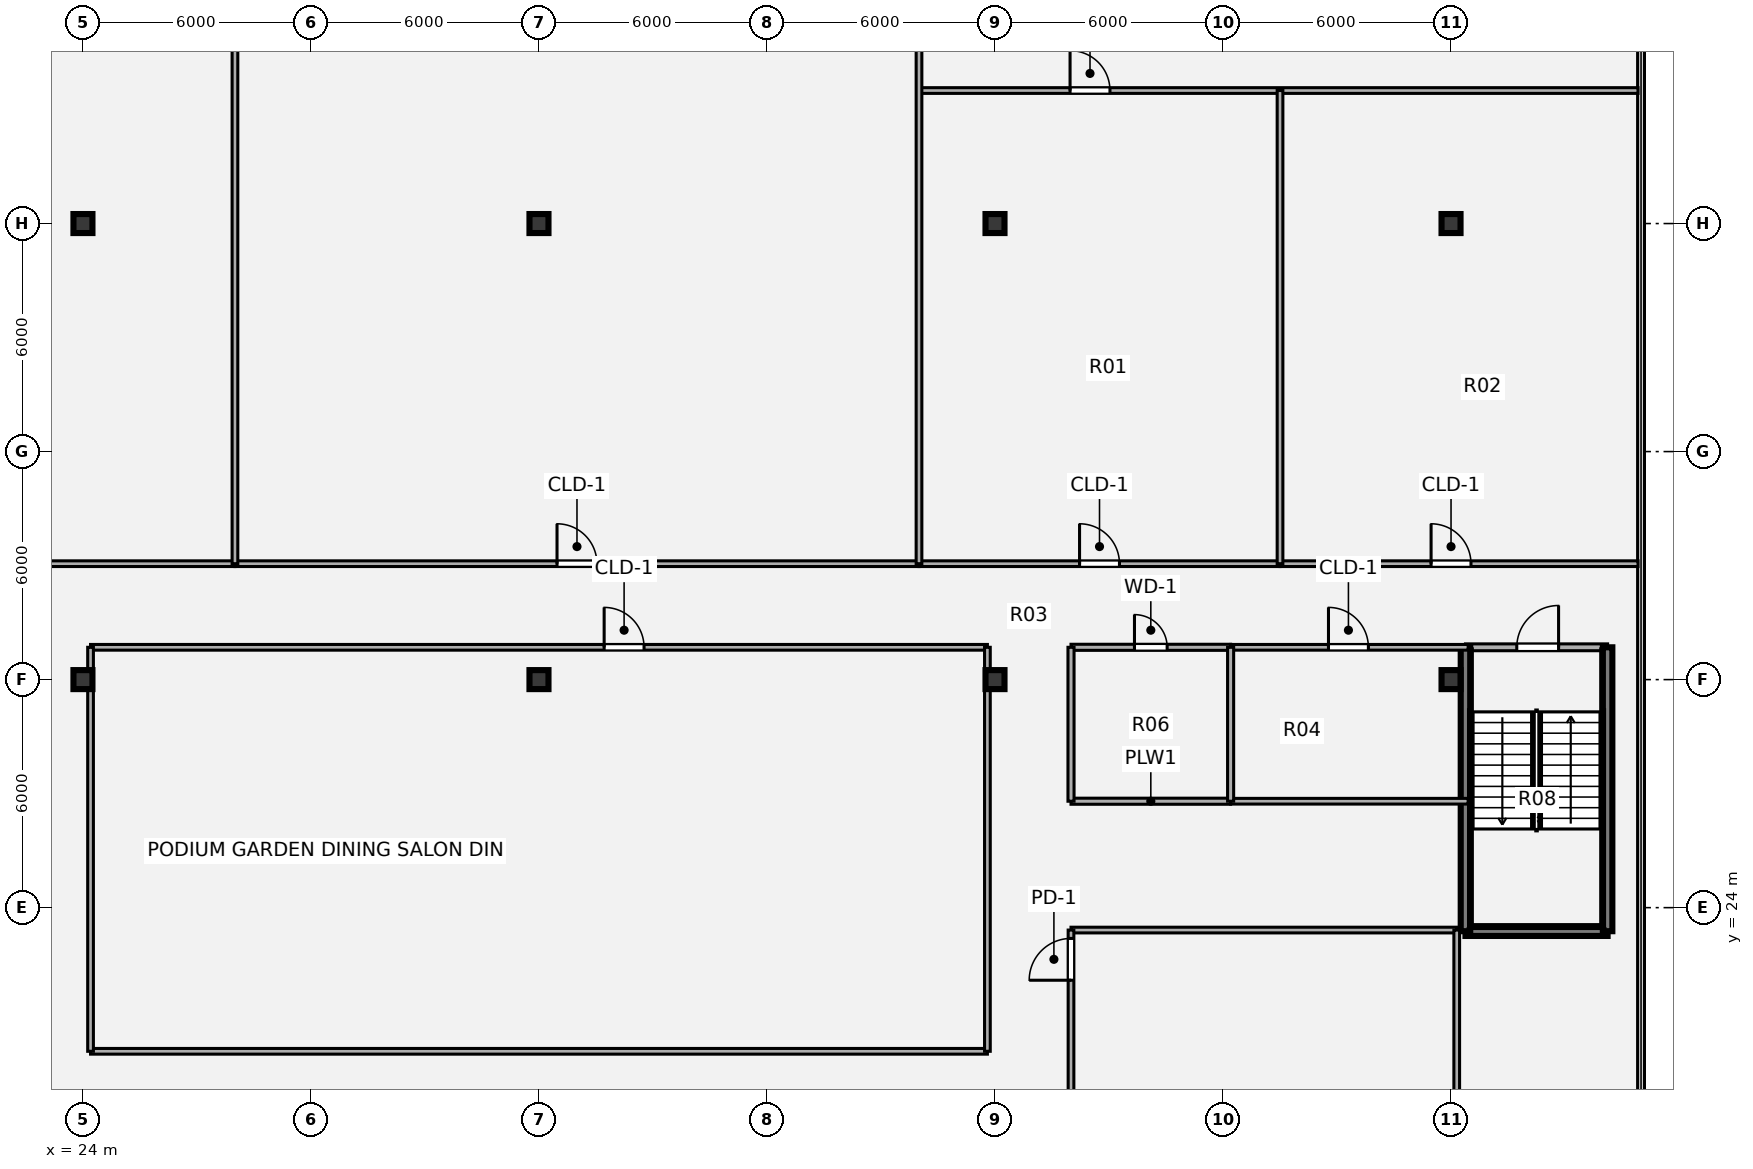
"""IFC4 building model, lengths in metres.
Left out: names, types, materials, properties, quantities, classifications, styles, units other than length and angle.
Written with IfcOpenShell. Run it as: python <this file> out.ifc"""

import sys

from ifc_helpers import new_model, si_unit, direction, frame, frame_2d, origin, origin_2d, place, context, subcontext, project, spatial, rectangle, i_section, extrude, source, transform, mapped, element, fill, save


model = new_model("IFC4")
c1 = context("Model", 3, precision=1e-05, world=origin(), true_north=direction((0.0, 1.0)))
c2 = subcontext(c1, "Body", "Model", "MODEL_VIEW")
j1 = project(units=[si_unit("LENGTHUNIT", "METRE"), si_unit("PLANEANGLEUNIT", "RADIAN")], contexts=[c1])
p1 = place(None, origin())
s1 = spatial("IfcSite", under=j1, at=p1, CompositionType="ELEMENT")
p2 = place(p1, origin())
s2 = spatial("IfcBuilding", under=s1, at=p2, CompositionType="ELEMENT")
p3 = place(p2, frame((0.0, 0.0, 14.04)))
s3 = spatial("IfcBuildingStorey", under=s2, at=p3, CompositionType="ELEMENT", Elevation=14.04)
m1 = source(origin(), c2, "Body", "SweptSolid", [
    extrude(i_section(OverallWidth=0.5, OverallDepth=0.5, WebThickness=0.022, FlangeThickness=0.035, at=origin_2d()), origin(), (0.0, 0.0, 1.0), 4.32),
])
for number, where, z_axis, x_axis in (
    (1, (24.0, 30.0, 0.0), (0.0, 0.0, 1.0), (1.0, 0.0, 0.0)),
    (2, (36.0, 30.0, 0.0), (0.0, 0.0, 1.0), (1.0, 0.0, 0.0)),
    (3, (48.0, 30.0, 0.0), (0.0, 0.0, 1.0), (1.0, 0.0, 0.0)),
    (4, (60.0, 30.0, 0.0), (0.0, 0.0, 1.0), (1.0, 0.0, 0.0)),
    (5, (24.0, 42.0, 0.0), (0.0, 0.0, 1.0), (1.0, 0.0, 0.0)),
    (6, (36.0, 42.0, 0.0), (0.0, 0.0, 1.0), (1.0, 0.0, 0.0)),
    (7, (48.0, 42.0, 0.0), (0.0, 0.0, 1.0), (1.0, 0.0, 0.0)),
    (8, (60.0, 42.0, 0.0), (0.0, 0.0, 1.0), (1.0, 0.0, 0.0)),
):
    element("IfcColumn", number, at=place(p3, frame(where, z_axis=z_axis, x_axis=x_axis)), inside=s3, PredefinedType="COLUMN", context=c2, shape_type="MappedRepresentation", body=[
        mapped(m1, transform((0.0, 0.0, 0.0), x_axis=(1.0, 0.0, 0.0), y_axis=(0.0, 1.0, 0.0), z_axis=(0.0, 0.0, 1.0), scale=1.0)),
    ])
p4 = place(p3, frame((60.38, 30.85, 0.0), z_axis=(0.0, 0.0, 1.0), x_axis=(1.0, 0.0, 0.0)))
e9 = element("IfcWall", 9, at=p4, inside=s3, PredefinedType="PARTITIONING", context=c2, shape_type="SweptSolid", body=[
    extrude(rectangle(XDim=3.74, YDim=0.18, at=frame_2d((1.87, 0.0))), origin(), (0.0, 0.0, 1.0), 4.04),
])
p5 = place(p4, frame((1.35, 0.0, 0.0)))
e10 = element("IfcOpeningElement", 10, at=p5, cuts=e9, PredefinedType="OPENING", context=c2, shape_type="SweptSolid", body=[
    extrude(rectangle(XDim=1.1, YDim=2.1, at=origin_2d()), frame((0.55, 0.1, 1.05), z_axis=(0.0, -1.0, 0.0), x_axis=(1.0, 0.0, 0.0)), (0.0, 0.0, 1.0), 0.2),
])
p6 = place(p3, frame((60.38, 23.38, 0.0), z_axis=(0.0, 0.0, 1.0), x_axis=(1.0, 0.0, 0.0)))
e11 = element("IfcWall", 11, at=p6, inside=s3, PredefinedType="SHEAR", context=c2, shape_type="SweptSolid", body=[
    extrude(rectangle(XDim=3.74, YDim=0.25, at=frame_2d((1.87, 0.0))), origin(), (0.0, 0.0, 1.0), 4.32),
])
for number, where, z_axis, x_axis in (
    (12, (60.38, 23.38, 0.0), (0.0, 0.0, 1.0), (0.0, 1.0, 0.0)),
    (13, (64.12, 23.38, 0.0), (0.0, 0.0, 1.0), (0.0, 1.0, 0.0)),
):
    element("IfcWall", number, at=place(p3, frame(where, z_axis=z_axis, x_axis=x_axis)), inside=s3, PredefinedType="SHEAR", context=c2, shape_type="SweptSolid", body=[
        extrude(rectangle(XDim=7.47, YDim=0.25, at=frame_2d((3.735, 0.0))), origin(), (0.0, 0.0, 1.0), 4.32),
    ])
p7 = place(p3, frame((24.2, 20.22, 0.0), z_axis=(0.0, 0.0, 1.0), x_axis=(1.0, 0.0, 0.0)))
e14 = element("IfcWall", 14, at=p7, inside=s3, PredefinedType="PARTITIONING", context=c2, shape_type="SweptSolid", body=[
    extrude(rectangle(XDim=23.6, YDim=0.15, at=frame_2d((11.8, 0.0))), origin(), (0.0, 0.0, 1.0), 4.01),
])
p8 = place(p3, frame((50.0, 23.41, 0.0), z_axis=(0.0, 0.0, 1.0), x_axis=(1.0, 0.0, 0.0)))
e15 = element("IfcWall", 15, at=p8, inside=s3, PredefinedType="PARTITIONING", context=c2, shape_type="SweptSolid", body=[
    extrude(rectangle(XDim=10.15, YDim=0.15, at=frame_2d((5.075, 0.0))), origin(), (0.0, 0.0, 1.0), 4.01),
])
p9 = place(p3, frame((50.0, 26.8, 0.0), z_axis=(0.0, 0.0, 1.0), x_axis=(1.0, 0.0, 0.0)))
e16 = element("IfcWall", 16, at=p9, inside=s3, PredefinedType="PLUMBINGWALL", context=c2, shape_type="SweptSolid", body=[
    extrude(rectangle(XDim=4.2, YDim=0.16, at=frame_2d((2.1, 0.0))), origin(), (0.0, 0.0, 1.0), 4.01),
])
p10 = place(p3, frame((54.2, 26.8, 0.0), z_axis=(0.0, 0.0, 1.0), x_axis=(1.0, 0.0, 0.0)))
e17 = element("IfcWall", 17, at=p10, inside=s3, PredefinedType="PARTITIONING", context=c2, shape_type="SweptSolid", body=[
    extrude(rectangle(XDim=6.25, YDim=0.15, at=frame_2d((3.125, 0.0))), origin(), (0.0, 0.0, 1.0), 4.01),
])
p11 = place(p3, frame((24.2, 30.85, 0.0), z_axis=(0.0, 0.0, 1.0), x_axis=(1.0, 0.0, 0.0)))
e18 = element("IfcWall", 18, at=p11, inside=s3, PredefinedType="PARTITIONING", context=c2, shape_type="SweptSolid", body=[
    extrude(rectangle(XDim=23.6, YDim=0.15, at=frame_2d((11.8, 0.0))), origin(), (0.0, 0.0, 1.0), 4.01),
])
p12 = place(p11, frame((13.515, 0.0, 0.0)))
e19 = element("IfcOpeningElement", 19, at=p12, cuts=e18, PredefinedType="OPENING", context=c2, shape_type="SweptSolid", body=[
    extrude(rectangle(XDim=1.05, YDim=2.1, at=origin_2d()), frame((0.525, 0.085, 1.05), z_axis=(0.0, -1.0, 0.0), x_axis=(1.0, 0.0, 0.0)), (0.0, 0.0, 1.0), 0.17),
])
p13 = place(p3, frame((50.0, 30.85, 0.0), z_axis=(0.0, 0.0, 1.0), x_axis=(1.0, 0.0, 0.0)))
e20 = element("IfcWall", 20, at=p13, inside=s3, PredefinedType="PLUMBINGWALL", context=c2, shape_type="SweptSolid", body=[
    extrude(rectangle(XDim=4.2, YDim=0.16, at=frame_2d((2.1, 0.0))), origin(), (0.0, 0.0, 1.0), 4.01),
])
p14 = place(p13, frame((1.67, 0.0, 0.0)))
e21 = element("IfcOpeningElement", 21, at=p14, cuts=e20, PredefinedType="OPENING", context=c2, shape_type="SweptSolid", body=[
    extrude(rectangle(XDim=0.86, YDim=2.1, at=origin_2d()), frame((0.43, 0.09, 1.05), z_axis=(0.0, -1.0, 0.0), x_axis=(1.0, 0.0, 0.0)), (0.0, 0.0, 1.0), 0.18),
])
p15 = place(p3, frame((54.2, 30.85, 0.0), z_axis=(0.0, 0.0, 1.0), x_axis=(1.0, 0.0, 0.0)))
e22 = element("IfcWall", 22, at=p15, inside=s3, PredefinedType="PARTITIONING", context=c2, shape_type="SweptSolid", body=[
    extrude(rectangle(XDim=6.25, YDim=0.15, at=frame_2d((3.125, 0.0))), origin(), (0.0, 0.0, 1.0), 4.01),
])
p16 = place(p15, frame((2.575, 0.0, 0.0)))
e23 = element("IfcOpeningElement", 23, at=p16, cuts=e22, PredefinedType="OPENING", context=c2, shape_type="SweptSolid", body=[
    extrude(rectangle(XDim=1.05, YDim=2.1, at=origin_2d()), frame((0.525, 0.085, 1.05), z_axis=(0.0, -1.0, 0.0), x_axis=(1.0, 0.0, 0.0)), (0.0, 0.0, 1.0), 0.17),
])
p17 = place(p3, frame((7.08, 33.05, 0.0), z_axis=(0.0, 0.0, 1.0), x_axis=(1.0, 0.0, 0.0)))
e24 = element("IfcWall", 24, at=p17, inside=s3, PredefinedType="PARTITIONING", context=c2, shape_type="SweptSolid", body=[
    extrude(rectangle(XDim=20.92, YDim=0.15, at=frame_2d((10.46, 0.0))), origin(), (0.0, 0.0, 1.0), 4.01),
])
p18 = place(p17, frame((12.395, 0.0, 0.0)))
e25 = element("IfcOpeningElement", 25, at=p18, cuts=e24, PredefinedType="OPENING", context=c2, shape_type="SweptSolid", body=[
    extrude(rectangle(XDim=1.05, YDim=2.1, at=origin_2d()), frame((0.525, 0.085, 1.05), z_axis=(0.0, -1.0, 0.0), x_axis=(1.0, 0.0, 0.0)), (0.0, 0.0, 1.0), 0.17),
])
p19 = place(p3, frame((28.0, 33.05, 0.0), z_axis=(0.0, 0.0, 1.0), x_axis=(1.0, 0.0, 0.0)))
e26 = element("IfcWall", 26, at=p19, inside=s3, PredefinedType="PARTITIONING", context=c2, shape_type="SweptSolid", body=[
    extrude(rectangle(XDim=18.0, YDim=0.15, at=frame_2d((9.0, 0.0))), origin(), (0.0, 0.0, 1.0), 4.01),
])
p20 = place(p19, frame((8.475, 0.0, 0.0)))
e27 = element("IfcOpeningElement", 27, at=p20, cuts=e26, PredefinedType="OPENING", context=c2, shape_type="SweptSolid", body=[
    extrude(rectangle(XDim=1.05, YDim=2.1, at=origin_2d()), frame((0.525, 0.085, 1.05), z_axis=(0.0, -1.0, 0.0), x_axis=(1.0, 0.0, 0.0)), (0.0, 0.0, 1.0), 0.17),
])
p21 = place(p3, frame((46.0, 33.05, 0.0), z_axis=(0.0, 0.0, 1.0), x_axis=(1.0, 0.0, 0.0)))
e28 = element("IfcWall", 28, at=p21, inside=s3, PredefinedType="PARTITIONING", context=c2, shape_type="SweptSolid", body=[
    extrude(rectangle(XDim=9.5, YDim=0.15, at=frame_2d((4.75, 0.0))), origin(), (0.0, 0.0, 1.0), 4.01),
])
p22 = place(p21, frame((4.225, 0.0, 0.0)))
e29 = element("IfcOpeningElement", 29, at=p22, cuts=e28, PredefinedType="OPENING", context=c2, shape_type="SweptSolid", body=[
    extrude(rectangle(XDim=1.05, YDim=2.1, at=origin_2d()), frame((0.525, 0.085, 1.05), z_axis=(0.0, -1.0, 0.0), x_axis=(1.0, 0.0, 0.0)), (0.0, 0.0, 1.0), 0.17),
])
p23 = place(p3, frame((55.5, 33.05, 0.0), z_axis=(0.0, 0.0, 1.0), x_axis=(1.0, 0.0, 0.0)))
e30 = element("IfcWall", 30, at=p23, inside=s3, PredefinedType="PARTITIONING", context=c2, shape_type="SweptSolid", body=[
    extrude(rectangle(XDim=9.42, YDim=0.15, at=frame_2d((4.71, 0.0))), origin(), (0.0, 0.0, 1.0), 4.01),
])
p24 = place(p23, frame((3.975, 0.0, 0.0)))
e31 = element("IfcOpeningElement", 31, at=p24, cuts=e30, PredefinedType="OPENING", context=c2, shape_type="SweptSolid", body=[
    extrude(rectangle(XDim=1.05, YDim=2.1, at=origin_2d()), frame((0.525, 0.085, 1.05), z_axis=(0.0, -1.0, 0.0), x_axis=(1.0, 0.0, 0.0)), (0.0, 0.0, 1.0), 0.17),
])
p25 = place(p3, frame((46.0, 45.5, 0.0), z_axis=(0.0, 0.0, 1.0), x_axis=(1.0, 0.0, 0.0)))
e32 = element("IfcWall", 32, at=p25, inside=s3, PredefinedType="PARTITIONING", context=c2, shape_type="SweptSolid", body=[
    extrude(rectangle(XDim=18.92, YDim=0.15, at=frame_2d((9.46, 0.0))), origin(), (0.0, 0.0, 1.0), 4.01),
])
p26 = place(p25, frame((3.975, 0.0, 0.0)))
e33 = element("IfcOpeningElement", 33, at=p26, cuts=e32, PredefinedType="OPENING", context=c2, shape_type="SweptSolid", body=[
    extrude(rectangle(XDim=1.05, YDim=2.1, at=origin_2d()), frame((0.525, 0.085, 1.05), z_axis=(0.0, -1.0, 0.0), x_axis=(1.0, 0.0, 0.0)), (0.0, 0.0, 1.0), 0.17),
])
p27 = place(p3, frame((24.2, 20.22, 0.0), z_axis=(0.0, 0.0, 1.0), x_axis=(0.0, 1.0, 0.0)))
e34 = element("IfcWall", 34, at=p27, inside=s3, PredefinedType="PARTITIONING", context=c2, shape_type="SweptSolid", body=[
    extrude(rectangle(XDim=10.63, YDim=0.15, at=frame_2d((5.315, 0.0))), origin(), (0.0, 0.0, 1.0), 3.225),
])
for number, where, z_axis, x_axis in (
    (35, (28.0, 33.05, 0.0), (0.0, 0.0, 1.0), (0.0, 1.0, 0.0)),
    (36, (46.0, 33.05, 0.0), (0.0, 0.0, 1.0), (0.0, 1.0, 0.0)),
):
    element("IfcWall", number, at=place(p3, frame(where, z_axis=z_axis, x_axis=x_axis)), inside=s3, PredefinedType="PARTITIONING", context=c2, shape_type="SweptSolid", body=[
        extrude(rectangle(XDim=25.47, YDim=0.15, at=frame_2d((12.735, 0.0))), origin(), (0.0, 0.0, 1.0), 3.666),
    ])
p28 = place(p3, frame((47.8, 20.22, 0.0), z_axis=(0.0, 0.0, 1.0), x_axis=(0.0, 1.0, 0.0)))
e37 = element("IfcWall", 37, at=p28, inside=s3, PredefinedType="PARTITIONING", context=c2, shape_type="SweptSolid", body=[
    extrude(rectangle(XDim=10.63, YDim=0.15, at=frame_2d((5.315, 0.0))), origin(), (0.0, 0.0, 1.0), 3.225),
])
p29 = place(p3, frame((50.0, 6.2, 0.0), z_axis=(0.0, 0.0, 1.0), x_axis=(0.0, 1.0, 0.0)))
e38 = element("IfcWall", 38, at=p29, inside=s3, PredefinedType="PARTITIONING", context=c2, shape_type="SweptSolid", body=[
    extrude(rectangle(XDim=17.21, YDim=0.15, at=frame_2d((8.605, 0.0))), origin(), (0.0, 0.0, 1.0), 3.718),
])
p30 = place(p29, frame((15.89, 0.0, 0.0)))
e39 = element("IfcOpeningElement", 39, at=p30, cuts=e38, PredefinedType="OPENING", context=c2, shape_type="SweptSolid", body=[
    extrude(rectangle(XDim=1.1, YDim=2.1, at=origin_2d()), frame((0.55, 0.085, 1.05), z_axis=(0.0, -1.0, 0.0), x_axis=(1.0, 0.0, 0.0)), (0.0, 0.0, 1.0), 0.17),
])
for number, where, z_axis, x_axis in (
    (40, (50.0, 26.8, 0.0), (0.0, 0.0, 1.0), (0.0, 1.0, 0.0)),
    (41, (54.2, 26.8, 0.0), (0.0, 0.0, 1.0), (0.0, 1.0, 0.0)),
):
    element("IfcWall", number, at=place(p3, frame(where, z_axis=z_axis, x_axis=x_axis)), inside=s3, PredefinedType="PLUMBINGWALL", context=c2, shape_type="SweptSolid", body=[
        extrude(rectangle(XDim=4.05, YDim=0.16, at=frame_2d((2.025, 0.0))), origin(), (0.0, 0.0, 1.0), 3.666),
    ])
p31 = place(p3, frame((55.5, 33.05, 0.0), z_axis=(0.0, 0.0, 1.0), x_axis=(0.0, 1.0, 0.0)))
e42 = element("IfcWall", 42, at=p31, inside=s3, PredefinedType="PARTITIONING", context=c2, shape_type="SweptSolid", body=[
    extrude(rectangle(XDim=12.45, YDim=0.15, at=frame_2d((6.225, 0.0))), origin(), (0.0, 0.0, 1.0), 3.666),
])
p32 = place(p3, frame((60.15, 6.2, 0.0), z_axis=(0.0, 0.0, 1.0), x_axis=(0.0, 1.0, 0.0)))
e43 = element("IfcWall", 43, at=p32, inside=s3, PredefinedType="PARTITIONING", context=c2, shape_type="SweptSolid", body=[
    extrude(rectangle(XDim=17.21, YDim=0.15, at=frame_2d((8.605, 0.0))), origin(), (0.0, 0.0, 1.0), 3.225),
])
m2 = source(origin(), c2, "Body", "SweptSolid", [
    extrude(rectangle(XDim=1.1, YDim=2.1, at=origin_2d()), frame((0.55, 0.025, 1.05), z_axis=(0.0, -1.0, 0.0), x_axis=(1.0, 0.0, 0.0)), (0.0, 0.0, 1.0), 0.05),
])
p33 = place(p5, origin())
e44 = element("IfcDoor", 44, at=p33, inside=s3, OperationType="SINGLE_SWING_RIGHT", PredefinedType="DOOR", context=c2, shape_type="MappedRepresentation", body=[
    mapped(m2, transform((0.0, 0.0, 0.0), x_axis=(1.0, 0.0, 0.0), y_axis=(0.0, 1.0, 0.0), z_axis=(0.0, 0.0, 1.0), scale=1.0)),
])
fill(e10, e44)
m3 = source(origin(), c2, "Body", "SweptSolid", [
    extrude(rectangle(XDim=1.05, YDim=2.1, at=origin_2d()), frame((0.525, 0.025, 1.05), z_axis=(0.0, -1.0, 0.0), x_axis=(1.0, 0.0, 0.0)), (0.0, 0.0, 1.0), 0.05),
])
p34 = place(p12, origin())
e45 = element("IfcDoor", 45, at=p34, inside=s3, OperationType="SINGLE_SWING_LEFT", PredefinedType="DOOR", context=c2, shape_type="MappedRepresentation", body=[
    mapped(m3, transform((0.0, 0.0, 0.0), x_axis=(1.0, 0.0, 0.0), y_axis=(0.0, 1.0, 0.0), z_axis=(0.0, 0.0, 1.0), scale=1.0)),
])
fill(e19, e45)
m4 = source(origin(), c2, "Body", "SweptSolid", [
    extrude(rectangle(XDim=0.86, YDim=2.1, at=origin_2d()), frame((0.43, 0.025, 1.05), z_axis=(0.0, -1.0, 0.0), x_axis=(1.0, 0.0, 0.0)), (0.0, 0.0, 1.0), 0.05),
])
p35 = place(p14, origin())
e46 = element("IfcDoor", 46, at=p35, inside=s3, OperationType="SINGLE_SWING_LEFT", PredefinedType="DOOR", context=c2, shape_type="MappedRepresentation", body=[
    mapped(m4, transform((0.0, 0.0, 0.0), x_axis=(1.0, 0.0, 0.0), y_axis=(0.0, 1.0, 0.0), z_axis=(0.0, 0.0, 1.0), scale=1.0)),
])
fill(e21, e46)
p36 = place(p16, origin())
e47 = element("IfcDoor", 47, at=p36, inside=s3, OperationType="SINGLE_SWING_LEFT", PredefinedType="DOOR", context=c2, shape_type="MappedRepresentation", body=[
    mapped(m3, transform((0.0, 0.0, 0.0), x_axis=(1.0, 0.0, 0.0), y_axis=(0.0, 1.0, 0.0), z_axis=(0.0, 0.0, 1.0), scale=1.0)),
])
fill(e23, e47)
p37 = place(p20, origin())
e48 = element("IfcDoor", 48, at=p37, inside=s3, OperationType="SINGLE_SWING_LEFT", PredefinedType="DOOR", context=c2, shape_type="MappedRepresentation", body=[
    mapped(m3, transform((0.0, 0.0, 0.0), x_axis=(1.0, 0.0, 0.0), y_axis=(0.0, 1.0, 0.0), z_axis=(0.0, 0.0, 1.0), scale=1.0)),
])
fill(e27, e48)
p38 = place(p22, origin())
e49 = element("IfcDoor", 49, at=p38, inside=s3, OperationType="SINGLE_SWING_LEFT", PredefinedType="DOOR", context=c2, shape_type="MappedRepresentation", body=[
    mapped(m3, transform((0.0, 0.0, 0.0), x_axis=(1.0, 0.0, 0.0), y_axis=(0.0, 1.0, 0.0), z_axis=(0.0, 0.0, 1.0), scale=1.0)),
])
fill(e29, e49)
p39 = place(p24, origin())
e50 = element("IfcDoor", 50, at=p39, inside=s3, OperationType="SINGLE_SWING_LEFT", PredefinedType="DOOR", context=c2, shape_type="MappedRepresentation", body=[
    mapped(m3, transform((0.0, 0.0, 0.0), x_axis=(1.0, 0.0, 0.0), y_axis=(0.0, 1.0, 0.0), z_axis=(0.0, 0.0, 1.0), scale=1.0)),
])
fill(e31, e50)
p40 = place(p26, origin())
e51 = element("IfcDoor", 51, at=p40, inside=s3, OperationType="SINGLE_SWING_LEFT", PredefinedType="DOOR", context=c2, shape_type="MappedRepresentation", body=[
    mapped(m3, transform((0.0, 0.0, 0.0), x_axis=(1.0, 0.0, 0.0), y_axis=(0.0, 1.0, 0.0), z_axis=(0.0, 0.0, 1.0), scale=1.0)),
])
fill(e33, e51)
m5 = source(origin(), c2, "Body", "SweptSolid", [
    extrude(rectangle(XDim=1.1, YDim=2.1, at=origin_2d()), frame((0.55, 0.025, 1.05), z_axis=(0.0, -1.0, 0.0), x_axis=(1.0, 0.0, 0.0)), (0.0, 0.0, 1.0), 0.05),
])
p41 = place(p30, origin())
e52 = element("IfcDoor", 52, at=p41, inside=s3, OperationType="SINGLE_SWING_LEFT", PredefinedType="DOOR", context=c2, shape_type="MappedRepresentation", body=[
    mapped(m5, transform((0.0, 0.0, 0.0), x_axis=(1.0, 0.0, 0.0), y_axis=(0.0, 1.0, 0.0), z_axis=(0.0, 0.0, 1.0), scale=1.0)),
])
fill(e39, e52)
save(model, sys.argv[1])
